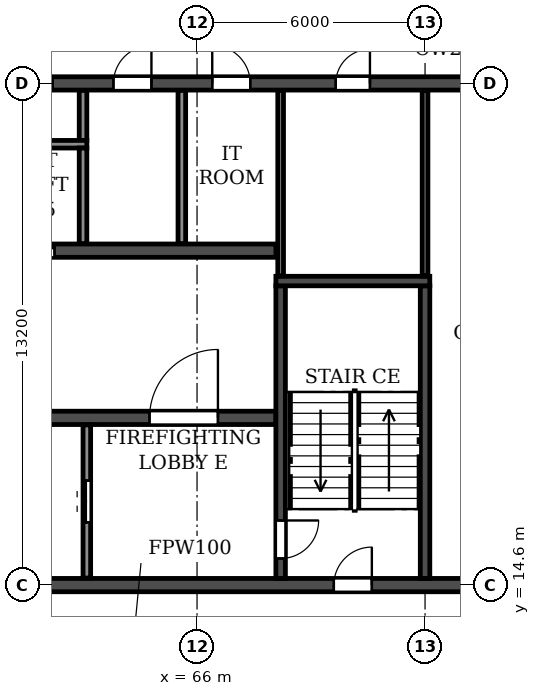
"""IFC4 building model, lengths in metres.
Left out: names, types, materials, properties, quantities, classifications, styles, units other than length and angle.
Written with IfcOpenShell. Run it as: python <this file> out.ifc"""

import sys

from ifc_helpers import new_model, si_unit, direction, frame, frame_2d, origin, place, context, subcontext, project, spatial, rectangle, extrude, element, fill, save


model = new_model("IFC4")
c1 = context("Model", 3, precision=1e-05, world=origin(), true_north=direction((0.0, 1.0)))
c2 = subcontext(c1, "Body", "Model", "MODEL_VIEW")
j1 = project(units=[si_unit("LENGTHUNIT", "METRE"), si_unit("PLANEANGLEUNIT", "RADIAN")], contexts=[c1])
p1 = place(None, origin())
s1 = spatial("IfcSite", under=j1, at=p1, CompositionType="ELEMENT")
p2 = place(p1, origin())
s2 = spatial("IfcBuilding", under=s1, at=p2, CompositionType="ELEMENT")
p3 = place(p2, frame((0.0, 0.0, 231.3)))
s3 = spatial("IfcBuildingStorey", under=s2, at=p3, CompositionType="ELEMENT", Elevation=231.3)
p4 = place(p3, frame((18.2, 14.6, 0.0), z_axis=(0.0, 0.0, 1.0), x_axis=(1.0, 0.0, 0.0)))
e1 = element("IfcWall", 1, at=p4, inside=s3, PredefinedType="SOLIDWALL", context=c2, shape_type="SweptSolid", body=[
    extrude(rectangle(XDim=65.6, YDim=0.35, at=frame_2d((32.8, 0.0))), origin(), (0.0, 0.0, 1.0), 3.08),
])
p5 = place(p4, frame((0.7, 0.0, 0.0)))
e2 = element("IfcOpeningElement", 2, at=p5, cuts=e1, PredefinedType="OPENING", context=c2, shape_type="SweptSolid", body=[
    extrude(rectangle(XDim=1.0, YDim=2.1, at=frame_2d((0.5, 1.05))), frame((0.0, 0.185, 0.0), z_axis=(0.0, -1.0, 0.0), x_axis=(1.0, 0.0, 0.0)), (0.0, 0.0, 1.0), 0.37),
])
p6 = place(p4, frame((8.6, 0.0, 0.0)))
e3 = element("IfcOpeningElement", 3, at=p6, cuts=e1, PredefinedType="OPENING", context=c2, shape_type="SweptSolid", body=[
    extrude(rectangle(XDim=1.0, YDim=2.1, at=frame_2d((0.5, 1.05))), frame((0.0, 0.185, 0.0), z_axis=(0.0, -1.0, 0.0), x_axis=(1.0, 0.0, 0.0)), (0.0, 0.0, 1.0), 0.37),
])
p7 = place(p4, frame((13.2, 0.0, 0.0)))
e4 = element("IfcOpeningElement", 4, at=p7, cuts=e1, PredefinedType="OPENING", context=c2, shape_type="SweptSolid", body=[
    extrude(rectangle(XDim=1.0, YDim=2.1, at=frame_2d((0.5, 1.05))), frame((0.0, 0.185, 0.0), z_axis=(0.0, -1.0, 0.0), x_axis=(1.0, 0.0, 0.0)), (0.0, 0.0, 1.0), 0.37),
])
p8 = place(p4, frame((24.5, 0.0, 0.0)))
e5 = element("IfcOpeningElement", 5, at=p8, cuts=e1, PredefinedType="OPENING", context=c2, shape_type="SweptSolid", body=[
    extrude(rectangle(XDim=1.0, YDim=2.1, at=frame_2d((0.5, 1.05))), frame((0.0, 0.185, 0.0), z_axis=(0.0, -1.0, 0.0), x_axis=(1.0, 0.0, 0.0)), (0.0, 0.0, 1.0), 0.37),
])
p9 = place(p4, frame((28.4, 0.0, 0.0)))
e6 = element("IfcOpeningElement", 6, at=p9, cuts=e1, PredefinedType="OPENING", context=c2, shape_type="SweptSolid", body=[
    extrude(rectangle(XDim=1.0, YDim=2.1, at=frame_2d((0.5, 1.05))), frame((0.0, 0.185, 0.0), z_axis=(0.0, -1.0, 0.0), x_axis=(1.0, 0.0, 0.0)), (0.0, 0.0, 1.0), 0.37),
])
p10 = place(p4, frame((32.3, 0.0, 0.0)))
e7 = element("IfcOpeningElement", 7, at=p10, cuts=e1, PredefinedType="OPENING", context=c2, shape_type="SweptSolid", body=[
    extrude(rectangle(XDim=1.0, YDim=2.1, at=frame_2d((0.5, 1.05))), frame((0.0, 0.185, 0.0), z_axis=(0.0, -1.0, 0.0), x_axis=(1.0, 0.0, 0.0)), (0.0, 0.0, 1.0), 0.37),
])
p11 = place(p4, frame((36.2, 0.0, 0.0)))
e8 = element("IfcOpeningElement", 8, at=p11, cuts=e1, PredefinedType="OPENING", context=c2, shape_type="SweptSolid", body=[
    extrude(rectangle(XDim=1.0, YDim=2.1, at=frame_2d((0.5, 1.05))), frame((0.0, 0.185, 0.0), z_axis=(0.0, -1.0, 0.0), x_axis=(1.0, 0.0, 0.0)), (0.0, 0.0, 1.0), 0.37),
])
p12 = place(p4, frame((40.1, 0.0, 0.0)))
e9 = element("IfcOpeningElement", 9, at=p12, cuts=e1, PredefinedType="OPENING", context=c2, shape_type="SweptSolid", body=[
    extrude(rectangle(XDim=1.0, YDim=2.1, at=frame_2d((0.5, 1.05))), frame((0.0, 0.185, 0.0), z_axis=(0.0, -1.0, 0.0), x_axis=(1.0, 0.0, 0.0)), (0.0, 0.0, 1.0), 0.37),
])
p13 = place(p4, frame((51.4, 0.0, 0.0)))
e10 = element("IfcOpeningElement", 10, at=p13, cuts=e1, PredefinedType="OPENING", context=c2, shape_type="SweptSolid", body=[
    extrude(rectangle(XDim=1.0, YDim=2.1, at=frame_2d((0.5, 1.05))), frame((0.0, 0.185, 0.0), z_axis=(0.0, -1.0, 0.0), x_axis=(1.0, 0.0, 0.0)), (0.0, 0.0, 1.0), 0.37),
])
p14 = place(p4, frame((56.0, 0.0, 0.0)))
e11 = element("IfcOpeningElement", 11, at=p14, cuts=e1, PredefinedType="OPENING", context=c2, shape_type="SweptSolid", body=[
    extrude(rectangle(XDim=1.0, YDim=2.1, at=frame_2d((0.5, 1.05))), frame((0.0, 0.185, 0.0), z_axis=(0.0, -1.0, 0.0), x_axis=(1.0, 0.0, 0.0)), (0.0, 0.0, 1.0), 0.37),
])
p15 = place(p4, frame((63.9, 0.0, 0.0)))
e12 = element("IfcOpeningElement", 12, at=p15, cuts=e1, PredefinedType="OPENING", context=c2, shape_type="SweptSolid", body=[
    extrude(rectangle(XDim=1.0, YDim=2.1, at=frame_2d((0.5, 1.05))), frame((0.0, 0.185, 0.0), z_axis=(0.0, -1.0, 0.0), x_axis=(1.0, 0.0, 0.0)), (0.0, 0.0, 1.0), 0.37),
])
p16 = place(p3, frame((18.2, 27.8, 0.0), z_axis=(0.0, 0.0, 1.0), x_axis=(1.0, 0.0, 0.0)))
e13 = element("IfcWall", 13, at=p16, inside=s3, PredefinedType="SOLIDWALL", context=c2, shape_type="SweptSolid", body=[
    extrude(rectangle(XDim=65.6, YDim=0.35, at=frame_2d((32.8, 0.0))), origin(), (0.0, 0.0, 1.0), 3.08),
])
p17 = place(p16, frame((0.7, 0.0, 0.0)))
e14 = element("IfcOpeningElement", 14, at=p17, cuts=e13, PredefinedType="OPENING", context=c2, shape_type="SweptSolid", body=[
    extrude(rectangle(XDim=1.0, YDim=2.1, at=frame_2d((0.5, 1.05))), frame((0.0, 0.185, 0.0), z_axis=(0.0, -1.0, 0.0), x_axis=(1.0, 0.0, 0.0)), (0.0, 0.0, 1.0), 0.37),
])
p18 = place(p16, frame((4.05, 0.0, 0.0)))
e15 = element("IfcOpeningElement", 15, at=p18, cuts=e13, PredefinedType="OPENING", context=c2, shape_type="SweptSolid", body=[
    extrude(rectangle(XDim=0.9, YDim=2.1, at=frame_2d((0.45, 1.05))), frame((0.0, 0.185, 0.0), z_axis=(0.0, -1.0, 0.0), x_axis=(1.0, 0.0, 0.0)), (0.0, 0.0, 1.0), 0.37),
])
p19 = place(p16, frame((13.25, 0.0, 0.0)))
e16 = element("IfcOpeningElement", 16, at=p19, cuts=e13, PredefinedType="OPENING", context=c2, shape_type="SweptSolid", body=[
    extrude(rectangle(XDim=0.9, YDim=2.1, at=frame_2d((0.45, 1.05))), frame((0.0, 0.185, 0.0), z_axis=(0.0, -1.0, 0.0), x_axis=(1.0, 0.0, 0.0)), (0.0, 0.0, 1.0), 0.37),
])
p20 = place(p16, frame((16.4, 0.0, 0.0)))
e17 = element("IfcOpeningElement", 17, at=p20, cuts=e13, PredefinedType="OPENING", context=c2, shape_type="SweptSolid", body=[
    extrude(rectangle(XDim=1.0, YDim=2.1, at=frame_2d((0.5, 1.05))), frame((0.0, 0.185, 0.0), z_axis=(0.0, -1.0, 0.0), x_axis=(1.0, 0.0, 0.0)), (0.0, 0.0, 1.0), 0.37),
])
p21 = place(p16, frame((21.6, 0.0, 0.0)))
e18 = element("IfcOpeningElement", 18, at=p21, cuts=e13, PredefinedType="OPENING", context=c2, shape_type="SweptSolid", body=[
    extrude(rectangle(XDim=1.0, YDim=2.1, at=frame_2d((0.5, 1.05))), frame((0.0, 0.185, 0.0), z_axis=(0.0, -1.0, 0.0), x_axis=(1.0, 0.0, 0.0)), (0.0, 0.0, 1.0), 0.37),
])
p22 = place(p16, frame((29.4, 0.0, 0.0)))
e19 = element("IfcOpeningElement", 19, at=p22, cuts=e13, PredefinedType="OPENING", context=c2, shape_type="SweptSolid", body=[
    extrude(rectangle(XDim=1.0, YDim=2.1, at=frame_2d((0.5, 1.05))), frame((0.0, 0.185, 0.0), z_axis=(0.0, -1.0, 0.0), x_axis=(1.0, 0.0, 0.0)), (0.0, 0.0, 1.0), 0.37),
])
p23 = place(p16, frame((32.3, 0.0, 0.0)))
e20 = element("IfcOpeningElement", 20, at=p23, cuts=e13, PredefinedType="OPENING", context=c2, shape_type="SweptSolid", body=[
    extrude(rectangle(XDim=1.0, YDim=2.1, at=frame_2d((0.5, 1.05))), frame((0.0, 0.185, 0.0), z_axis=(0.0, -1.0, 0.0), x_axis=(1.0, 0.0, 0.0)), (0.0, 0.0, 1.0), 0.37),
])
p24 = place(p16, frame((35.2, 0.0, 0.0)))
e21 = element("IfcOpeningElement", 21, at=p24, cuts=e13, PredefinedType="OPENING", context=c2, shape_type="SweptSolid", body=[
    extrude(rectangle(XDim=1.0, YDim=2.1, at=frame_2d((0.5, 1.05))), frame((0.0, 0.185, 0.0), z_axis=(0.0, -1.0, 0.0), x_axis=(1.0, 0.0, 0.0)), (0.0, 0.0, 1.0), 0.37),
])
p25 = place(p16, frame((37.8, 0.0, 0.0)))
e22 = element("IfcOpeningElement", 22, at=p25, cuts=e13, PredefinedType="OPENING", context=c2, shape_type="SweptSolid", body=[
    extrude(rectangle(XDim=1.0, YDim=2.1, at=frame_2d((0.5, 1.05))), frame((0.0, 0.185, 0.0), z_axis=(0.0, -1.0, 0.0), x_axis=(1.0, 0.0, 0.0)), (0.0, 0.0, 1.0), 0.37),
])
p26 = place(p16, frame((40.4, 0.0, 0.0)))
e23 = element("IfcOpeningElement", 23, at=p26, cuts=e13, PredefinedType="OPENING", context=c2, shape_type="SweptSolid", body=[
    extrude(rectangle(XDim=1.0, YDim=2.1, at=frame_2d((0.5, 1.05))), frame((0.0, 0.185, 0.0), z_axis=(0.0, -1.0, 0.0), x_axis=(1.0, 0.0, 0.0)), (0.0, 0.0, 1.0), 0.37),
])
p27 = place(p16, frame((43.0, 0.0, 0.0)))
e24 = element("IfcOpeningElement", 24, at=p27, cuts=e13, PredefinedType="OPENING", context=c2, shape_type="SweptSolid", body=[
    extrude(rectangle(XDim=1.0, YDim=2.1, at=frame_2d((0.5, 1.05))), frame((0.0, 0.185, 0.0), z_axis=(0.0, -1.0, 0.0), x_axis=(1.0, 0.0, 0.0)), (0.0, 0.0, 1.0), 0.37),
])
p28 = place(p16, frame((45.6, 0.0, 0.0)))
e25 = element("IfcOpeningElement", 25, at=p28, cuts=e13, PredefinedType="OPENING", context=c2, shape_type="SweptSolid", body=[
    extrude(rectangle(XDim=1.0, YDim=2.1, at=frame_2d((0.5, 1.05))), frame((0.0, 0.185, 0.0), z_axis=(0.0, -1.0, 0.0), x_axis=(1.0, 0.0, 0.0)), (0.0, 0.0, 1.0), 0.37),
])
p29 = place(p16, frame((48.2, 0.0, 0.0)))
e26 = element("IfcOpeningElement", 26, at=p29, cuts=e13, PredefinedType="OPENING", context=c2, shape_type="SweptSolid", body=[
    extrude(rectangle(XDim=1.0, YDim=2.1, at=frame_2d((0.5, 1.05))), frame((0.0, 0.185, 0.0), z_axis=(0.0, -1.0, 0.0), x_axis=(1.0, 0.0, 0.0)), (0.0, 0.0, 1.0), 0.37),
])
p30 = place(p16, frame((51.45, 0.0, 0.0)))
e27 = element("IfcOpeningElement", 27, at=p30, cuts=e13, PredefinedType="OPENING", context=c2, shape_type="SweptSolid", body=[
    extrude(rectangle(XDim=0.9, YDim=2.1, at=frame_2d((0.45, 1.05))), frame((0.0, 0.185, 0.0), z_axis=(0.0, -1.0, 0.0), x_axis=(1.0, 0.0, 0.0)), (0.0, 0.0, 1.0), 0.37),
])
p31 = place(p16, frame((60.65, 0.0, 0.0)))
e28 = element("IfcOpeningElement", 28, at=p31, cuts=e13, PredefinedType="OPENING", context=c2, shape_type="SweptSolid", body=[
    extrude(rectangle(XDim=0.9, YDim=2.1, at=frame_2d((0.45, 1.05))), frame((0.0, 0.185, 0.0), z_axis=(0.0, -1.0, 0.0), x_axis=(1.0, 0.0, 0.0)), (0.0, 0.0, 1.0), 0.37),
])
p32 = place(p16, frame((63.9, 0.0, 0.0)))
e29 = element("IfcOpeningElement", 29, at=p32, cuts=e13, PredefinedType="OPENING", context=c2, shape_type="SweptSolid", body=[
    extrude(rectangle(XDim=1.0, YDim=2.1, at=frame_2d((0.5, 1.05))), frame((0.0, 0.185, 0.0), z_axis=(0.0, -1.0, 0.0), x_axis=(1.0, 0.0, 0.0)), (0.0, 0.0, 1.0), 0.37),
])
p33 = place(p3, frame((33.925, 19.0, 0.0), z_axis=(0.0, 0.0, 1.0), x_axis=(1.0, 0.0, 0.0)))
e30 = element("IfcWall", 30, at=p33, inside=s3, PredefinedType="SOLIDWALL", context=c2, shape_type="SweptSolid", body=[
    extrude(rectangle(XDim=34.15, YDim=0.35, at=frame_2d((17.075, 0.0))), origin(), (0.0, 0.0, 1.0), 3.08),
])
p34 = place(p33, frame((16.175, 0.0, 0.0)))
e31 = element("IfcOpeningElement", 31, at=p34, cuts=e30, PredefinedType="OPENING", context=c2, shape_type="SweptSolid", body=[
    extrude(rectangle(XDim=1.8, YDim=2.1, at=frame_2d((0.9, 1.05))), frame((0.0, 0.185, 0.0), z_axis=(0.0, -1.0, 0.0), x_axis=(1.0, 0.0, 0.0)), (0.0, 0.0, 1.0), 0.37),
])
p35 = place(p33, frame((1.525, 0.0, 0.0)))
e32 = element("IfcOpeningElement", 32, at=p35, cuts=e30, PredefinedType="OPENING", context=c2, shape_type="SweptSolid", body=[
    extrude(rectangle(XDim=1.8, YDim=2.1, at=frame_2d((0.9, 1.05))), frame((0.0, 0.185, 0.0), z_axis=(0.0, -1.0, 0.0), x_axis=(1.0, 0.0, 0.0)), (0.0, 0.0, 1.0), 0.37),
])
p36 = place(p33, frame((30.825, 0.0, 0.0)))
e33 = element("IfcOpeningElement", 33, at=p36, cuts=e30, PredefinedType="OPENING", context=c2, shape_type="SweptSolid", body=[
    extrude(rectangle(XDim=1.8, YDim=2.1, at=frame_2d((0.9, 1.05))), frame((0.0, 0.185, 0.0), z_axis=(0.0, -1.0, 0.0), x_axis=(1.0, 0.0, 0.0)), (0.0, 0.0, 1.0), 0.37),
])
p37 = place(p3, frame((33.925, 23.4, 0.0), z_axis=(0.0, 0.0, 1.0), x_axis=(1.0, 0.0, 0.0)))
e34 = element("IfcWall", 34, at=p37, inside=s3, PredefinedType="SOLIDWALL", context=c2, shape_type="SweptSolid", body=[
    extrude(rectangle(XDim=34.15, YDim=0.35, at=frame_2d((17.075, 0.0))), origin(), (0.0, 0.0, 1.0), 3.08),
])
p38 = place(p37, frame((16.175, 0.0, 0.0)))
e35 = element("IfcOpeningElement", 35, at=p38, cuts=e34, PredefinedType="OPENING", context=c2, shape_type="SweptSolid", body=[
    extrude(rectangle(XDim=1.8, YDim=2.1, at=frame_2d((0.9, 1.05))), frame((0.0, 0.185, 0.0), z_axis=(0.0, -1.0, 0.0), x_axis=(1.0, 0.0, 0.0)), (0.0, 0.0, 1.0), 0.37),
])
p39 = place(p37, frame((0.625, 0.0, 0.0)))
e36 = element("IfcOpeningElement", 36, at=p39, cuts=e34, PredefinedType="OPENING", context=c2, shape_type="SweptSolid", body=[
    extrude(rectangle(XDim=1.1, YDim=2.1, at=frame_2d((0.55, 1.05))), frame((0.0, 0.185, 0.0), z_axis=(0.0, -1.0, 0.0), x_axis=(1.0, 0.0, 0.0)), (0.0, 0.0, 1.0), 0.37),
])
p40 = place(p37, frame((3.225, 0.0, 0.0)))
e37 = element("IfcOpeningElement", 37, at=p40, cuts=e34, PredefinedType="OPENING", context=c2, shape_type="SweptSolid", body=[
    extrude(rectangle(XDim=1.1, YDim=2.1, at=frame_2d((0.55, 1.05))), frame((0.0, 0.185, 0.0), z_axis=(0.0, -1.0, 0.0), x_axis=(1.0, 0.0, 0.0)), (0.0, 0.0, 1.0), 0.37),
])
p41 = place(p37, frame((5.825, 0.0, 0.0)))
e38 = element("IfcOpeningElement", 38, at=p41, cuts=e34, PredefinedType="OPENING", context=c2, shape_type="SweptSolid", body=[
    extrude(rectangle(XDim=1.1, YDim=2.1, at=frame_2d((0.55, 1.05))), frame((0.0, 0.185, 0.0), z_axis=(0.0, -1.0, 0.0), x_axis=(1.0, 0.0, 0.0)), (0.0, 0.0, 1.0), 0.37),
])
p42 = place(p37, frame((8.425, 0.0, 0.0)))
e39 = element("IfcOpeningElement", 39, at=p42, cuts=e34, PredefinedType="OPENING", context=c2, shape_type="SweptSolid", body=[
    extrude(rectangle(XDim=1.1, YDim=2.1, at=frame_2d((0.55, 1.05))), frame((0.0, 0.185, 0.0), z_axis=(0.0, -1.0, 0.0), x_axis=(1.0, 0.0, 0.0)), (0.0, 0.0, 1.0), 0.37),
])
p43 = place(p37, frame((11.025, 0.0, 0.0)))
e40 = element("IfcOpeningElement", 40, at=p43, cuts=e34, PredefinedType="OPENING", context=c2, shape_type="SweptSolid", body=[
    extrude(rectangle(XDim=1.1, YDim=2.1, at=frame_2d((0.55, 1.05))), frame((0.0, 0.185, 0.0), z_axis=(0.0, -1.0, 0.0), x_axis=(1.0, 0.0, 0.0)), (0.0, 0.0, 1.0), 0.37),
])
p44 = place(p37, frame((13.625, 0.0, 0.0)))
e41 = element("IfcOpeningElement", 41, at=p44, cuts=e34, PredefinedType="OPENING", context=c2, shape_type="SweptSolid", body=[
    extrude(rectangle(XDim=1.1, YDim=2.1, at=frame_2d((0.55, 1.05))), frame((0.0, 0.185, 0.0), z_axis=(0.0, -1.0, 0.0), x_axis=(1.0, 0.0, 0.0)), (0.0, 0.0, 1.0), 0.37),
])
p45 = place(p37, frame((27.225, 0.0, 0.0)))
e42 = element("IfcOpeningElement", 42, at=p45, cuts=e34, PredefinedType="OPENING", context=c2, shape_type="SweptSolid", body=[
    extrude(rectangle(XDim=1.1, YDim=2.1, at=frame_2d((0.55, 1.05))), frame((0.0, 0.185, 0.0), z_axis=(0.0, -1.0, 0.0), x_axis=(1.0, 0.0, 0.0)), (0.0, 0.0, 1.0), 0.37),
])
p46 = place(p3, frame((68.2, 14.775, 0.0), z_axis=(0.0, 0.0, 1.0), x_axis=(0.0, 1.0, 0.0)))
e43 = element("IfcWall", 43, at=p46, inside=s3, PredefinedType="SOLIDWALL", context=c2, shape_type="SweptSolid", body=[
    extrude(rectangle(XDim=7.7, YDim=0.25, at=frame_2d((3.85, 0.0))), origin(), (0.0, 0.0, 1.0), 3.08),
])
p47 = place(p46, frame((0.525, 0.0, 0.0)))
e44 = element("IfcOpeningElement", 44, at=p47, cuts=e43, PredefinedType="OPENING", context=c2, shape_type="SweptSolid", body=[
    extrude(rectangle(XDim=1.0, YDim=2.1, at=frame_2d((0.5, 1.05))), frame((0.0, 0.135, 0.0), z_axis=(0.0, -1.0, 0.0), x_axis=(1.0, 0.0, 0.0)), (0.0, 0.0, 1.0), 0.27),
])
p48 = place(p3, frame((72.0, 14.775, 0.0), z_axis=(0.0, 0.0, 1.0), x_axis=(0.0, 1.0, 0.0)))
e45 = element("IfcWall", 45, at=p48, inside=s3, PredefinedType="SOLIDWALL", context=c2, shape_type="SweptSolid", body=[
    extrude(rectangle(XDim=7.7, YDim=0.25, at=frame_2d((3.85, 0.0))), origin(), (0.0, 0.0, 1.0), 3.08),
])
p49 = place(p3, frame((68.075, 22.6, 0.0), z_axis=(0.0, 0.0, 1.0), x_axis=(1.0, 0.0, 0.0)))
e46 = element("IfcWall", 46, at=p49, inside=s3, PredefinedType="SOLIDWALL", context=c2, shape_type="SweptSolid", body=[
    extrude(rectangle(XDim=4.05, YDim=0.25, at=frame_2d((2.025, 0.0))), origin(), (0.0, 0.0, 1.0), 3.08),
])
p50 = place(p3, frame((63.0, 26.3, 0.0), z_axis=(0.0, 0.0, 1.0), x_axis=(0.0, 1.0, 0.0)))
e47 = element("IfcWall", 47, at=p50, inside=s3, PredefinedType="PARTITIONING", context=c2, shape_type="SweptSolid", body=[
    extrude(rectangle(XDim=1.315, YDim=0.2, at=frame_2d((0.657, 0.0))), origin(), (0.0, 0.0, 1.0), 3.08),
])
p51 = place(p3, frame((65.6, 23.585, 0.0), z_axis=(0.0, 0.0, 1.0), x_axis=(0.0, 1.0, 0.0)))
e48 = element("IfcWall", 48, at=p51, inside=s3, PredefinedType="PARTITIONING", context=c2, shape_type="SweptSolid", body=[
    extrude(rectangle(XDim=4.03, YDim=0.2, at=frame_2d((2.015, 0.0))), origin(), (0.0, 0.0, 1.0), 3.08),
])
for number, where, z_axis, x_axis in (
    (49, (68.2, 22.735, 0.0), (0.0, 0.0, 1.0), (0.0, 1.0, 0.0)),
    (50, (72.0, 22.735, 0.0), (0.0, 0.0, 1.0), (0.0, 1.0, 0.0)),
):
    element("IfcWall", number, at=place(p3, frame(where, z_axis=z_axis, x_axis=x_axis)), inside=s3, PredefinedType="PARTITIONING", context=c2, shape_type="SweptSolid", body=[
        extrude(rectangle(XDim=4.88, YDim=0.15, at=frame_2d((2.44, 0.0))), origin(), (0.0, 0.0, 1.0), 3.08),
    ])
p52 = place(p3, frame((57.7, 26.2, 0.0), z_axis=(0.0, 0.0, 1.0), x_axis=(1.0, 0.0, 0.0)))
e51 = element("IfcWall", 51, at=p52, inside=s3, PredefinedType="PARTITIONING", context=c2, shape_type="SweptSolid", body=[
    extrude(rectangle(XDim=5.4, YDim=0.2, at=frame_2d((2.7, 0.0))), origin(), (0.0, 0.0, 1.0), 3.08),
])
p53 = place(p3, frame((63.0, 23.585, 0.0), z_axis=(0.0, 0.0, 1.0), x_axis=(0.0, 1.0, 0.0)))
e52 = element("IfcWall", 52, at=p53, inside=s3, PredefinedType="PARTITIONING", context=c2, shape_type="SweptSolid", body=[
    extrude(rectangle(XDim=2.515, YDim=0.2, at=frame_2d((1.258, 0.0))), origin(), (0.0, 0.0, 1.0), 3.08),
])
p54 = place(p3, frame((63.1, 14.785, 0.0), z_axis=(0.0, 0.0, 1.0), x_axis=(0.0, 1.0, 0.0)))
e53 = element("IfcWall", 53, at=p54, inside=s3, PredefinedType="PARTITIONING", context=c2, shape_type="SweptSolid", body=[
    extrude(rectangle(XDim=4.03, YDim=0.2, at=frame_2d((2.015, 0.0))), origin(), (0.0, 0.0, 1.0), 3.08),
])
p55 = place(p54, frame((1.465, 0.0, 0.0)))
e54 = element("IfcOpeningElement", 54, at=p55, cuts=e53, PredefinedType="OPENING", context=c2, shape_type="SweptSolid", body=[
    extrude(rectangle(XDim=1.1, YDim=2.1, at=frame_2d((0.55, 1.05))), frame((0.0, 0.11, 0.0), z_axis=(0.0, -1.0, 0.0), x_axis=(1.0, 0.0, 0.0)), (0.0, 0.0, 1.0), 0.22),
])
p56 = place(p28, origin())
e55 = element("IfcDoor", 55, at=p56, inside=s3, OperationType="SINGLE_SWING_RIGHT", PredefinedType="DOOR", context=c2, shape_type="SweptSolid", body=[
    extrude(rectangle(XDim=1.0, YDim=2.1, at=frame_2d((0.5, 1.05))), frame((0.0, 0.025, 0.0), z_axis=(0.0, -1.0, 0.0), x_axis=(1.0, 0.0, 0.0)), (0.0, 0.0, 1.0), 0.05),
])
fill(e25, e55)
p57 = place(p29, origin())
e56 = element("IfcDoor", 56, at=p57, inside=s3, OperationType="SINGLE_SWING_LEFT", PredefinedType="DOOR", context=c2, shape_type="SweptSolid", body=[
    extrude(rectangle(XDim=1.0, YDim=2.1, at=frame_2d((0.5, 1.05))), frame((0.0, 0.025, 0.0), z_axis=(0.0, -1.0, 0.0), x_axis=(1.0, 0.0, 0.0)), (0.0, 0.0, 1.0), 0.05),
])
fill(e26, e56)
p58 = place(p30, origin())
e57 = element("IfcDoor", 57, at=p58, inside=s3, OperationType="SINGLE_SWING_RIGHT", PredefinedType="DOOR", context=c2, shape_type="SweptSolid", body=[
    extrude(rectangle(XDim=0.9, YDim=2.1, at=frame_2d((0.45, 1.05))), frame((0.0, 0.025, 0.0), z_axis=(0.0, -1.0, 0.0), x_axis=(1.0, 0.0, 0.0)), (0.0, 0.0, 1.0), 0.05),
])
fill(e27, e57)
p59 = place(p13, origin())
e58 = element("IfcDoor", 58, at=p59, inside=s3, OperationType="SINGLE_SWING_RIGHT", PredefinedType="DOOR", context=c2, shape_type="SweptSolid", body=[
    extrude(rectangle(XDim=1.0, YDim=2.1, at=frame_2d((0.5, 1.05))), frame((0.0, 0.025, 0.0), z_axis=(0.0, -1.0, 0.0), x_axis=(1.0, 0.0, 0.0)), (0.0, 0.0, 1.0), 0.05),
])
fill(e10, e58)
p60 = place(p55, origin())
e59 = element("IfcDoor", 59, at=p60, inside=s3, OperationType="DOUBLE_DOOR_SLIDING", PredefinedType="DOOR", context=c2, shape_type="SweptSolid", body=[
    extrude(rectangle(XDim=1.1, YDim=2.1, at=frame_2d((0.55, 1.05))), frame((0.0, 0.025, 0.0), z_axis=(0.0, -1.0, 0.0), x_axis=(1.0, 0.0, 0.0)), (0.0, 0.0, 1.0), 0.05),
])
fill(e54, e59)
p61 = place(p47, frame((1.0, 0.0, 0.0), z_axis=(0.0, 0.0, 1.0), x_axis=(-1.0, 0.0, 0.0)))
e60 = element("IfcDoor", 60, at=p61, inside=s3, OperationType="SINGLE_SWING_LEFT", PredefinedType="DOOR", context=c2, shape_type="SweptSolid", body=[
    extrude(rectangle(XDim=1.0, YDim=2.1, at=frame_2d((0.5, 1.05))), frame((0.0, 0.025, 0.0), z_axis=(0.0, -1.0, 0.0), x_axis=(1.0, 0.0, 0.0)), (0.0, 0.0, 1.0), 0.05),
])
fill(e44, e60)
p62 = place(p45, origin())
e61 = element("IfcDoor", 61, at=p62, inside=s3, OperationType="DOUBLE_DOOR_SLIDING", PredefinedType="DOOR", context=c2, shape_type="SweptSolid", body=[
    extrude(rectangle(XDim=1.1, YDim=2.1, at=frame_2d((0.55, 1.05))), frame((0.0, 0.025, 0.0), z_axis=(0.0, -1.0, 0.0), x_axis=(1.0, 0.0, 0.0)), (0.0, 0.0, 1.0), 0.05),
])
fill(e42, e61)
p63 = place(p36, origin())
e62 = element("IfcDoor", 62, at=p63, inside=s3, OperationType="DOUBLE_DOOR_SINGLE_SWING", PredefinedType="DOOR", context=c2, shape_type="SweptSolid", body=[
    extrude(rectangle(XDim=1.8, YDim=2.1, at=frame_2d((0.9, 1.05))), frame((0.0, 0.025, 0.0), z_axis=(0.0, -1.0, 0.0), x_axis=(1.0, 0.0, 0.0)), (0.0, 0.0, 1.0), 0.05),
])
fill(e33, e62)
save(model, sys.argv[1])
